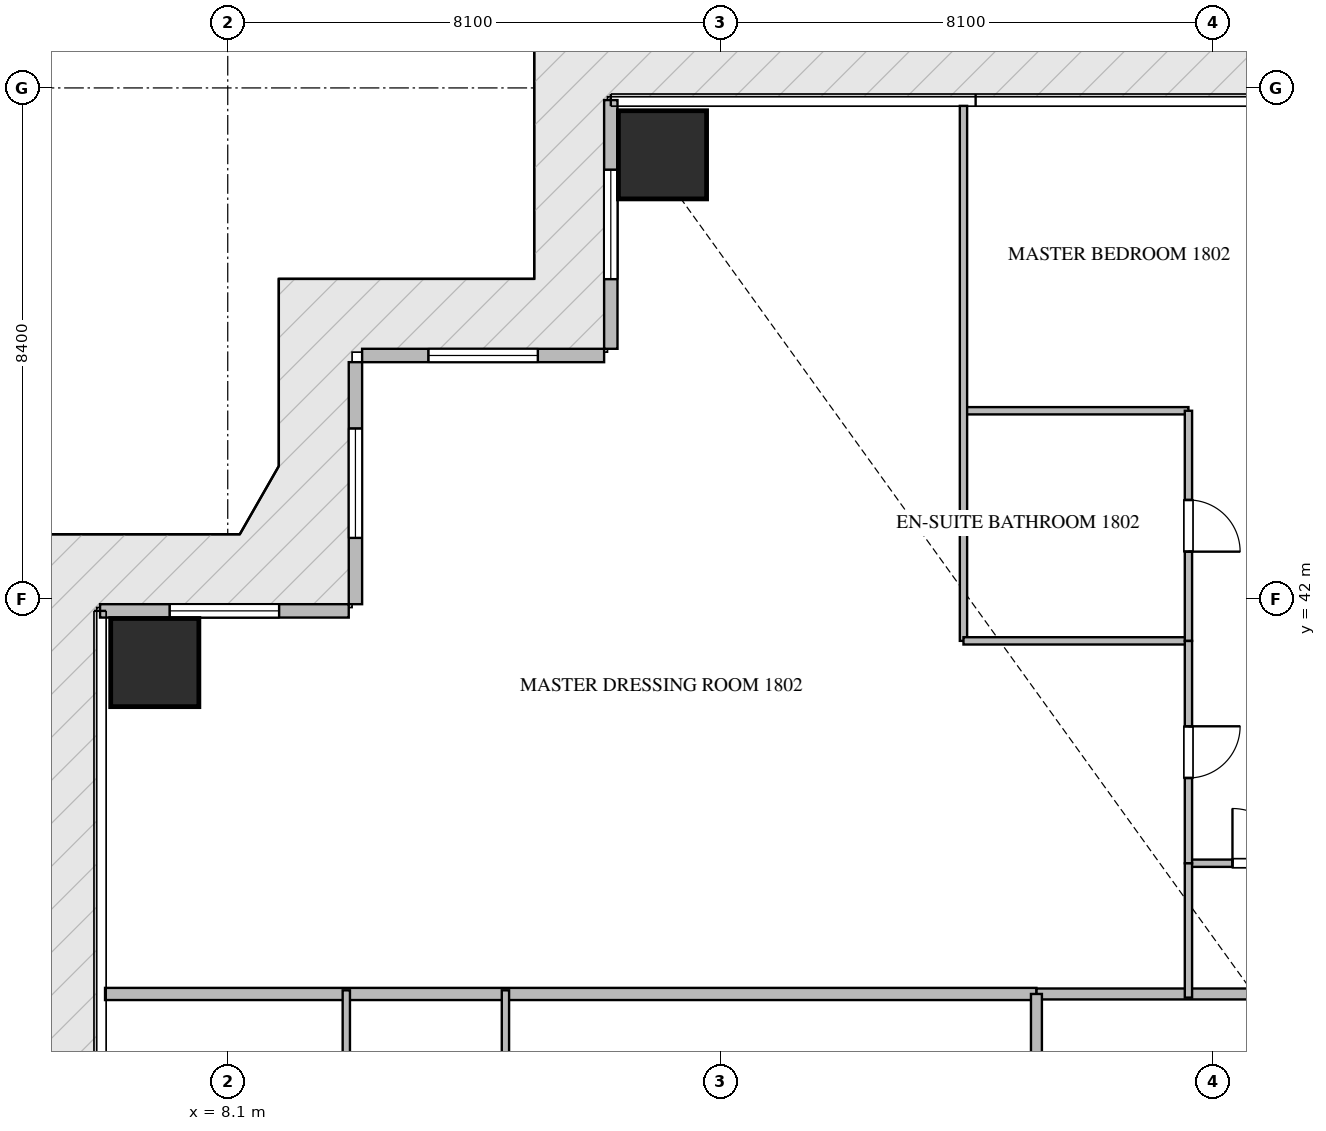
"""IFC4 building model, lengths in metres.
Left out: names, types, materials, properties, quantities, classifications, styles, units other than length and angle.
Written with IfcOpenShell. Run it as: python <this file> out.ifc"""

import sys

from ifc_helpers import new_model, si_unit, direction, frame, frame_2d, origin, origin_2d, place, context, subcontext, project, spatial, rectangle, extrude, source, transform, mapped, element, fill, save


model = new_model("IFC4")
c1 = context("Model", 3, precision=1e-05, world=origin(), true_north=direction((0.0, 1.0)))
c2 = subcontext(c1, "Body", "Model", "MODEL_VIEW")
j1 = project(units=[si_unit("LENGTHUNIT", "METRE"), si_unit("PLANEANGLEUNIT", "RADIAN")], contexts=[c1])
p1 = place(None, origin())
s1 = spatial("IfcSite", under=j1, at=p1, CompositionType="ELEMENT")
p2 = place(p1, origin())
s2 = spatial("IfcBuilding", under=s1, at=p2, CompositionType="ELEMENT")
p3 = place(p2, frame((0.0, 0.0, 75.45)))
s3 = spatial("IfcBuildingStorey", under=s2, at=p3, CompositionType="ELEMENT", Elevation=75.45)
m1 = source(origin(), c2, "Body", "SweptSolid", [
    extrude(rectangle(XDim=1.45, YDim=1.45, at=origin_2d()), origin(), (0.0, 0.0, 1.0), 3.75),
])
for number, where, z_axis, x_axis in (
    (1, (15.25, 49.3, -0.26), (0.0, 0.0, 1.0), (1.0, 0.0, 0.0)),
    (2, (6.9, 40.95, -0.26), (0.0, 0.0, 1.0), (1.0, 0.0, 0.0)),
):
    element("IfcColumn", number, at=place(p3, frame(where, z_axis=z_axis, x_axis=x_axis)), inside=s3, PredefinedType="COLUMN", context=c2, shape_type="MappedRepresentation", body=[
        mapped(m1, transform((0.0, 0.0, 0.0), scale=1.0)),
    ])
p4 = place(p3, frame((14.4, 50.2, 0.0), z_axis=(0.0, 0.0, 1.0), x_axis=(0.0, -1.0, 0.0)))
e3 = element("IfcWall", 3, at=p4, inside=s3, PredefinedType="ELEMENTEDWALL", context=c2, shape_type="SweptSolid", body=[
    extrude(rectangle(XDim=4.09, YDim=0.22, at=frame_2d((2.045, 0.0))), origin(), (0.0, 0.0, 1.0), 3.475),
])
p5 = place(p4, frame((1.145, 0.0, 0.65)))
e4 = element("IfcOpeningElement", 4, at=p5, cuts=e3, PredefinedType="OPENING", context=c2, shape_type="SweptSolid", body=[
    extrude(rectangle(XDim=1.8, YDim=2.1, at=frame_2d((0.9, 1.05))), frame((0.0, 0.12, 0.0), z_axis=(0.0, -1.0, 0.0), x_axis=(1.0, 0.0, 0.0)), (0.0, 0.0, 1.0), 0.24),
])
p6 = place(p3, frame((14.29, 46.0, 0.0), z_axis=(0.0, 0.0, 1.0), x_axis=(-1.0, 0.0, 0.0)))
e5 = element("IfcWall", 5, at=p6, inside=s3, PredefinedType="ELEMENTEDWALL", context=c2, shape_type="SweptSolid", body=[
    extrude(rectangle(XDim=3.98, YDim=0.22, at=frame_2d((1.99, 0.0))), origin(), (0.0, 0.0, 1.0), 3.475),
])
p7 = place(p6, frame((1.09, 0.0, 0.65)))
e6 = element("IfcOpeningElement", 6, at=p7, cuts=e5, PredefinedType="OPENING", context=c2, shape_type="SweptSolid", body=[
    extrude(rectangle(XDim=1.8, YDim=2.1, at=frame_2d((0.9, 1.05))), frame((0.0, 0.12, 0.0), z_axis=(0.0, -1.0, 0.0), x_axis=(1.0, 0.0, 0.0)), (0.0, 0.0, 1.0), 0.24),
])
p8 = place(p3, frame((10.2, 45.89, 0.0), z_axis=(0.0, 0.0, 1.0), x_axis=(0.0, -1.0, 0.0)))
e7 = element("IfcWall", 7, at=p8, inside=s3, PredefinedType="ELEMENTEDWALL", context=c2, shape_type="SweptSolid", body=[
    extrude(rectangle(XDim=3.98, YDim=0.22, at=frame_2d((1.99, 0.0))), origin(), (0.0, 0.0, 1.0), 3.475),
])
p9 = place(p8, frame((1.09, 0.0, 0.65)))
e8 = element("IfcOpeningElement", 8, at=p9, cuts=e7, PredefinedType="OPENING", context=c2, shape_type="SweptSolid", body=[
    extrude(rectangle(XDim=1.8, YDim=2.1, at=frame_2d((0.9, 1.05))), frame((0.0, 0.12, 0.0), z_axis=(0.0, -1.0, 0.0), x_axis=(1.0, 0.0, 0.0)), (0.0, 0.0, 1.0), 0.24),
])
p10 = place(p3, frame((10.09, 41.8, 0.0), z_axis=(0.0, 0.0, 1.0), x_axis=(-1.0, 0.0, 0.0)))
e9 = element("IfcWall", 9, at=p10, inside=s3, PredefinedType="ELEMENTEDWALL", context=c2, shape_type="SweptSolid", body=[
    extrude(rectangle(XDim=4.09, YDim=0.22, at=frame_2d((2.045, 0.0))), origin(), (0.0, 0.0, 1.0), 3.475),
])
p11 = place(p10, frame((1.145, 0.0, 0.65)))
e10 = element("IfcOpeningElement", 10, at=p11, cuts=e9, PredefinedType="OPENING", context=c2, shape_type="SweptSolid", body=[
    extrude(rectangle(XDim=1.8, YDim=2.1, at=frame_2d((0.9, 1.05))), frame((0.0, 0.12, 0.0), z_axis=(0.0, -1.0, 0.0), x_axis=(1.0, 0.0, 0.0)), (0.0, 0.0, 1.0), 0.24),
])
p12 = place(p3, frame((6.082, 35.5, 0.0), z_axis=(0.0, 0.0, 1.0), x_axis=(1.0, 0.0, 0.0)))
e11 = element("IfcWall", 11, at=p12, inside=s3, PredefinedType="PARTITIONING", context=c2, shape_type="SweptSolid", body=[
    extrude(rectangle(XDim=15.318, YDim=0.2, at=frame_2d((7.659, 0.0))), origin(), (0.0, 0.0, 1.0), 3.49),
])
p13 = place(p3, frame((21.402, 35.5, 0.0), z_axis=(0.0, 0.0, 1.0), x_axis=(1.0, 0.0, 0.0)))
e12 = element("IfcWall", 12, at=p13, inside=s3, PredefinedType="PARTITIONING", context=c2, shape_type="SweptSolid", body=[
    extrude(rectangle(XDim=21.996, YDim=0.18, at=frame_2d((10.998, 0.0))), origin(), (0.0, 0.0, 1.0), 3.49),
])
p14 = place(p13, frame((15.222, 0.0, 0.0)))
e13 = element("IfcOpeningElement", 13, at=p14, cuts=e12, PredefinedType="OPENING", context=c2, shape_type="SweptSolid", body=[
    extrude(rectangle(XDim=1.0, YDim=2.15, at=frame_2d((0.5, 1.075))), frame((0.0, 0.1, 0.0), z_axis=(0.0, -1.0, 0.0), x_axis=(1.0, 0.0, 0.0)), (0.0, 0.0, 1.0), 0.2),
])
p15 = place(p3, frame((21.4, 14.9, 0.0), z_axis=(0.0, 0.0, 1.0), x_axis=(0.0, 1.0, 0.0)))
e14 = element("IfcWall", 14, at=p15, inside=s3, PredefinedType="PARTITIONING", context=c2, shape_type="SweptSolid", body=[
    extrude(rectangle(XDim=20.6, YDim=0.18, at=frame_2d((10.3, 0.0))), origin(), (0.0, 0.0, 1.0), 3.49),
])
p16 = place(p15, frame((1.96, 0.0, 0.0)))
e15 = element("IfcOpeningElement", 15, at=p16, cuts=e14, PredefinedType="OPENING", context=c2, shape_type="SweptSolid", body=[
    extrude(rectangle(XDim=1.0, YDim=2.15, at=frame_2d((0.5, 1.075))), frame((0.0, 0.1, 0.0), z_axis=(0.0, -1.0, 0.0), x_axis=(1.0, 0.0, 0.0)), (0.0, 0.0, 1.0), 0.2),
])
p17 = place(p3, frame((23.9, 37.65, 0.0), z_axis=(0.0, 0.0, 1.0), x_axis=(1.0, 0.0, 0.0)))
e16 = element("IfcWall", 16, at=p17, inside=s3, PredefinedType="PARTITIONING", context=c2, shape_type="SweptSolid", body=[
    extrude(rectangle(XDim=2.348, YDim=0.12, at=frame_2d((1.174, 0.0))), origin(), (0.0, 0.0, 1.0), 3.49),
])
p18 = place(p17, frame((0.724, 0.0, 0.0)))
e17 = element("IfcOpeningElement", 17, at=p18, cuts=e16, PredefinedType="OPENING", context=c2, shape_type="SweptSolid", body=[
    extrude(rectangle(XDim=0.9, YDim=2.1, at=frame_2d((0.45, 1.05))), frame((0.0, 0.07, 0.0), z_axis=(0.0, -1.0, 0.0), x_axis=(1.0, 0.0, 0.0)), (0.0, 0.0, 1.0), 0.14),
])
p19 = place(p3, frame((20.2, 45.091, 0.0), z_axis=(0.0, 0.0, 1.0), x_axis=(1.0, 0.0, 0.0)))
e18 = element("IfcWall", 18, at=p19, inside=s3, PredefinedType="PARTITIONING", context=c2, shape_type="SweptSolid", body=[
    extrude(rectangle(XDim=3.7, YDim=0.12, at=frame_2d((1.85, 0.0))), origin(), (0.0, 0.0, 1.0), 3.49),
])
p20 = place(p3, frame((20.2, 50.105, 0.0), z_axis=(0.0, 0.0, 1.0), x_axis=(0.0, -1.0, 0.0)))
e19 = element("IfcWall", 19, at=p20, inside=s3, PredefinedType="PARTITIONING", context=c2, shape_type="SweptSolid", body=[
    extrude(rectangle(XDim=8.798, YDim=0.12, at=frame_2d((4.399, 0.0))), origin(), (0.0, 0.0, 1.0), 3.49),
])
p21 = place(p3, frame((20.2, 41.307, 0.0), z_axis=(0.0, 0.0, 1.0), x_axis=(1.0, 0.0, 0.0)))
e20 = element("IfcWall", 20, at=p21, inside=s3, PredefinedType="PARTITIONING", context=c2, shape_type="SweptSolid", body=[
    extrude(rectangle(XDim=3.7, YDim=0.12, at=frame_2d((1.85, 0.0))), origin(), (0.0, 0.0, 1.0), 3.49),
])
p22 = place(p3, frame((23.9, 45.091, 0.0), z_axis=(0.0, 0.0, 1.0), x_axis=(0.0, -1.0, 0.0)))
e21 = element("IfcWall", 21, at=p22, inside=s3, PredefinedType="PARTITIONING", context=c2, shape_type="SweptSolid", body=[
    extrude(rectangle(XDim=3.784, YDim=0.12, at=frame_2d((1.892, 0.0))), origin(), (0.0, 0.0, 1.0), 3.49),
])
p23 = place(p22, frame((1.467, 0.0, 0.0)))
e22 = element("IfcOpeningElement", 22, at=p23, cuts=e21, PredefinedType="OPENING", context=c2, shape_type="SweptSolid", body=[
    extrude(rectangle(XDim=0.85, YDim=2.1, at=frame_2d((0.425, 1.05))), frame((0.0, 0.07, 0.0), z_axis=(0.0, -1.0, 0.0), x_axis=(1.0, 0.0, 0.0)), (0.0, 0.0, 1.0), 0.14),
])
p24 = place(p3, frame((23.9, 41.305, 0.0), z_axis=(0.0, 0.0, 1.0), x_axis=(0.0, -1.0, 0.0)))
e23 = element("IfcWall", 23, at=p24, inside=s3, PredefinedType="PARTITIONING", context=c2, shape_type="SweptSolid", body=[
    extrude(rectangle(XDim=3.655, YDim=0.12, at=frame_2d((1.828, 0.0))), origin(), (0.0, 0.0, 1.0), 3.49),
])
p25 = place(p24, frame((1.403, 0.0, 0.0)))
e24 = element("IfcOpeningElement", 24, at=p25, cuts=e23, PredefinedType="OPENING", context=c2, shape_type="SweptSolid", body=[
    extrude(rectangle(XDim=0.85, YDim=2.1, at=frame_2d((0.425, 1.05))), frame((0.0, 0.07, 0.0), z_axis=(0.0, -1.0, 0.0), x_axis=(1.0, 0.0, 0.0)), (0.0, 0.0, 1.0), 0.14),
])
p26 = place(p3, frame((23.9, 37.648, 0.0), z_axis=(0.0, 0.0, 1.0), x_axis=(0.0, -1.0, 0.0)))
e25 = element("IfcWall", 25, at=p26, inside=s3, PredefinedType="PARTITIONING", context=c2, shape_type="SweptSolid", body=[
    extrude(rectangle(XDim=2.208, YDim=0.12, at=frame_2d((1.104, 0.0))), origin(), (0.0, 0.0, 1.0), 3.49),
])
for number, where, z_axis, x_axis in (
    (26, (10.05, 30.15, 0.0), (0.0, 0.0, 1.0), (0.0, 1.0, 0.0)),
    (27, (12.667, 30.15, 0.0), (0.0, 0.0, 1.0), (0.0, 1.0, 0.0)),
):
    element("IfcWall", number, at=place(p3, frame(where, z_axis=z_axis, x_axis=x_axis)), inside=s3, PredefinedType="PARTITIONING", context=c2, shape_type="SweptSolid", body=[
        extrude(rectangle(XDim=5.41, YDim=0.12, at=frame_2d((2.705, 0.0))), origin(), (0.0, 0.0, 1.0), 3.49),
    ])
m2 = source(origin(), c2, "Body", "SweptSolid", [
    extrude(rectangle(XDim=1.8, YDim=2.1, at=frame_2d((0.9, 1.05))), frame((0.0, 0.03, 0.0), z_axis=(0.0, -1.0, 0.0), x_axis=(1.0, 0.0, 0.0)), (0.0, 0.0, 1.0), 0.06),
])
p27 = place(p5, origin())
e28 = element("IfcWindow", 28, at=p27, inside=s3, PartitioningType="SINGLE_PANEL", PredefinedType="WINDOW", context=c2, shape_type="MappedRepresentation", body=[
    mapped(m2, transform((0.0, 0.0, 0.0), scale=1.0)),
])
fill(e4, e28)
p28 = place(p7, origin())
e29 = element("IfcWindow", 29, at=p28, inside=s3, PartitioningType="SINGLE_PANEL", PredefinedType="WINDOW", context=c2, shape_type="MappedRepresentation", body=[
    mapped(m2, transform((0.0, 0.0, 0.0), scale=1.0)),
])
fill(e6, e29)
p29 = place(p9, origin())
e30 = element("IfcWindow", 30, at=p29, inside=s3, PartitioningType="SINGLE_PANEL", PredefinedType="WINDOW", context=c2, shape_type="MappedRepresentation", body=[
    mapped(m2, transform((0.0, 0.0, 0.0), scale=1.0)),
])
fill(e8, e30)
p30 = place(p11, origin())
e31 = element("IfcWindow", 31, at=p30, inside=s3, PartitioningType="SINGLE_PANEL", PredefinedType="WINDOW", context=c2, shape_type="MappedRepresentation", body=[
    mapped(m2, transform((0.0, 0.0, 0.0), scale=1.0)),
])
fill(e10, e31)
m3 = source(origin(), c2, "Body", "SweptSolid", [
    extrude(rectangle(XDim=0.9, YDim=2.1, at=frame_2d((0.45, 1.05))), frame((0.0, 0.025, 0.0), z_axis=(0.0, -1.0, 0.0), x_axis=(1.0, 0.0, 0.0)), (0.0, 0.0, 1.0), 0.05),
])
p31 = place(p18, origin())
e32 = element("IfcDoor", 32, at=p31, inside=s3, OperationType="SINGLE_SWING_LEFT", PredefinedType="DOOR", context=c2, shape_type="MappedRepresentation", body=[
    mapped(m3, transform((0.0, 0.0, 0.0), scale=1.0)),
])
fill(e17, e32)
m4 = source(origin(), c2, "Body", "SweptSolid", [
    extrude(rectangle(XDim=0.85, YDim=2.1, at=frame_2d((0.425, 1.05))), frame((0.0, 0.025, 0.0), z_axis=(0.0, -1.0, 0.0), x_axis=(1.0, 0.0, 0.0)), (0.0, 0.0, 1.0), 0.05),
])
p32 = place(p23, origin())
e33 = element("IfcDoor", 33, at=p32, inside=s3, OperationType="SINGLE_SWING_RIGHT", PredefinedType="DOOR", context=c2, shape_type="MappedRepresentation", body=[
    mapped(m4, transform((0.0, 0.0, 0.0), scale=1.0)),
])
fill(e22, e33)
p33 = place(p25, origin())
e34 = element("IfcDoor", 34, at=p33, inside=s3, OperationType="SINGLE_SWING_LEFT", PredefinedType="DOOR", context=c2, shape_type="MappedRepresentation", body=[
    mapped(m4, transform((0.0, 0.0, 0.0), scale=1.0)),
])
fill(e24, e34)
save(model, sys.argv[1])
